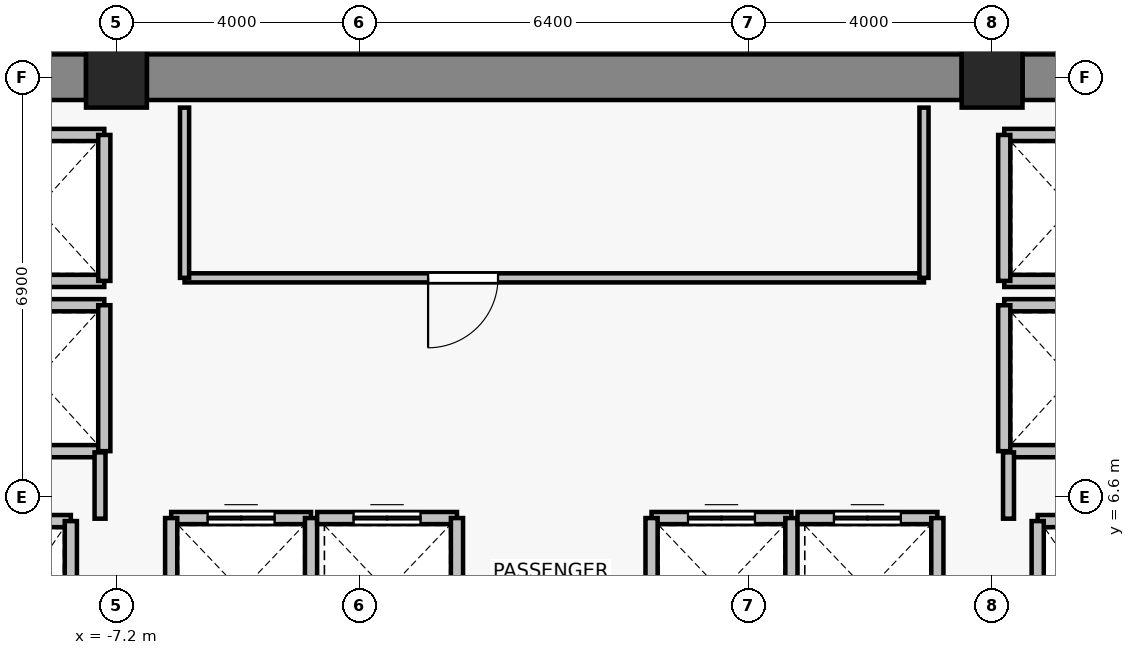
"""IFC4 building model, lengths in metres.
Left out: names, types, materials, properties, quantities, classifications, styles, units other than length and angle.
Written with IfcOpenShell. Run it as: python <this file> out.ifc"""

import sys

from ifc_helpers import new_model, si_unit, direction, frame, frame_2d, origin, origin_2d, place, context, subcontext, project, spatial, rectangle, extrude, source, transform, mapped, element, fill, save


model = new_model("IFC4")
c1 = context("Model", 3, precision=1e-05, world=origin(), true_north=direction((0.0, 1.0)))
c2 = subcontext(c1, "Body", "Model", "MODEL_VIEW")
j1 = project(units=[si_unit("LENGTHUNIT", "METRE"), si_unit("PLANEANGLEUNIT", "RADIAN")], contexts=[c1])
p1 = place(None, origin())
s1 = spatial("IfcSite", under=j1, at=p1, CompositionType="ELEMENT")
p2 = place(p1, origin())
s2 = spatial("IfcBuilding", under=s1, at=p2, CompositionType="ELEMENT")
p3 = place(p2, frame((0.0, 0.0, 109.9)))
s3 = spatial("IfcBuildingStorey", under=s2, at=p3, CompositionType="ELEMENT", Elevation=109.9)
for number, where, z_axis, x_axis in (
    (1, (-7.2, 13.5, 0.0), (0.0, 0.0, 1.0), (1.0, 0.0, 0.0)),
    (2, (7.2, 13.5, 0.0), (0.0, 0.0, 1.0), (1.0, 0.0, 0.0)),
):
    element("IfcColumn", number, at=place(p3, frame(where, z_axis=z_axis, x_axis=x_axis)), inside=s3, PredefinedType="COLUMN", context=c2, shape_type="SweptSolid", body=[
        extrude(rectangle(XDim=1.0, YDim=1.0, at=origin_2d()), origin(), (0.0, 0.0, 1.0), 3.3),
    ])
p4 = place(p3, frame((-13.9, 13.5, 0.0), z_axis=(0.0, 0.0, 1.0), x_axis=(1.0, 0.0, 0.0)))
e3 = element("IfcWall", 3, at=p4, inside=s3, PredefinedType="SHEAR", context=c2, shape_type="SweptSolid", body=[
    extrude(rectangle(XDim=6.2, YDim=0.75, at=frame_2d((3.1, 0.0))), origin(), (0.0, 0.0, 1.0), 3.075),
])
p5 = place(p3, frame((-6.7, 13.5, 0.0), z_axis=(0.0, 0.0, 1.0), x_axis=(1.0, 0.0, 0.0)))
e4 = element("IfcWall", 4, at=p5, inside=s3, PredefinedType="SHEAR", context=c2, shape_type="SweptSolid", body=[
    extrude(rectangle(XDim=13.4, YDim=0.75, at=frame_2d((6.7, 0.0))), origin(), (0.0, 0.0, 1.0), 3.075),
])
p6 = place(p3, frame((7.7, 13.5, 0.0), z_axis=(0.0, 0.0, 1.0), x_axis=(1.0, 0.0, 0.0)))
e5 = element("IfcWall", 5, at=p6, inside=s3, PredefinedType="SHEAR", context=c2, shape_type="SweptSolid", body=[
    extrude(rectangle(XDim=6.2, YDim=0.75, at=frame_2d((3.1, 0.0))), origin(), (0.0, 0.0, 1.0), 3.075),
])
p7 = place(p3, frame((-9.95, 6.2, 0.0), z_axis=(0.0, 0.0, 1.0), x_axis=(1.0, 0.0, 0.0)))
e6 = element("IfcWall", 6, at=p7, inside=s3, PredefinedType="SOLIDWALL", context=c2, shape_type="SweptSolid", body=[
    extrude(rectangle(XDim=2.0, YDim=0.2, at=frame_2d((1.0, 0.0))), origin(), (0.0, 0.0, 1.0), 3.075),
])
p8 = place(p3, frame((-7.95, 6.2, 0.0), z_axis=(0.0, 0.0, 1.0), x_axis=(0.0, -1.0, 0.0)))
e7 = element("IfcWall", 7, at=p8, inside=s3, PredefinedType="SOLIDWALL", context=c2, shape_type="SweptSolid", body=[
    extrude(rectangle(XDim=2.8, YDim=0.2, at=frame_2d((1.4, 0.0))), origin(), (0.0, 0.0, 1.0), 3.075),
])
p9 = place(p3, frame((7.95, 6.2, 0.0), z_axis=(0.0, 0.0, 1.0), x_axis=(1.0, 0.0, 0.0)))
e8 = element("IfcWall", 8, at=p9, inside=s3, PredefinedType="SOLIDWALL", context=c2, shape_type="SweptSolid", body=[
    extrude(rectangle(XDim=2.0, YDim=0.2, at=frame_2d((1.0, 0.0))), origin(), (0.0, 0.0, 1.0), 3.075),
])
p10 = place(p3, frame((7.95, 3.4, 0.0), z_axis=(0.0, 0.0, 1.0), x_axis=(0.0, 1.0, 0.0)))
e9 = element("IfcWall", 9, at=p10, inside=s3, PredefinedType="SOLIDWALL", context=c2, shape_type="SweptSolid", body=[
    extrude(rectangle(XDim=2.8, YDim=0.2, at=frame_2d((1.4, 0.0))), origin(), (0.0, 0.0, 1.0), 3.075),
])
p11 = place(p3, frame((-6.3, 6.25, 0.0), z_axis=(0.0, 0.0, 1.0), x_axis=(1.0, 0.0, 0.0)))
e10 = element("IfcWall", 10, at=p11, inside=s3, PredefinedType="SOLIDWALL", context=c2, shape_type="SweptSolid", body=[
    extrude(rectangle(XDim=2.3, YDim=0.2, at=frame_2d((1.15, 0.0))), origin(), (0.0, 0.0, 1.0), 3.075),
])
p12 = place(p11, frame((0.6, 0.0, 0.0)))
e11 = element("IfcOpeningElement", 11, at=p12, cuts=e10, PredefinedType="OPENING", context=c2, shape_type="SweptSolid", body=[
    extrude(rectangle(XDim=1.1, YDim=2.2, at=frame_2d((0.55, 1.1))), frame((0.0, 0.11, 0.0), z_axis=(0.0, -1.0, 0.0), x_axis=(1.0, 0.0, 0.0)), (0.0, 0.0, 1.0), 0.22),
])
for number, where, z_axis, x_axis in (
    (12, (-6.3, 3.85, 0.0), (0.0, 0.0, 1.0), (0.0, 1.0, 0.0)),
    (13, (-4.0, 6.25, 0.0), (0.0, 0.0, 1.0), (0.0, -1.0, 0.0)),
):
    element("IfcWall", number, at=place(p3, frame(where, z_axis=z_axis, x_axis=x_axis)), inside=s3, PredefinedType="SOLIDWALL", context=c2, shape_type="SweptSolid", body=[
        extrude(rectangle(XDim=2.4, YDim=0.2, at=frame_2d((1.2, 0.0))), origin(), (0.0, 0.0, 1.0), 3.075),
    ])
p13 = place(p3, frame((-3.9, 6.25, 0.0), z_axis=(0.0, 0.0, 1.0), x_axis=(1.0, 0.0, 0.0)))
e14 = element("IfcWall", 14, at=p13, inside=s3, PredefinedType="SOLIDWALL", context=c2, shape_type="SweptSolid", body=[
    extrude(rectangle(XDim=2.3, YDim=0.2, at=frame_2d((1.15, 0.0))), origin(), (0.0, 0.0, 1.0), 3.075),
])
p14 = place(p13, frame((0.6, 0.0, 0.0)))
e15 = element("IfcOpeningElement", 15, at=p14, cuts=e14, PredefinedType="OPENING", context=c2, shape_type="SweptSolid", body=[
    extrude(rectangle(XDim=1.1, YDim=2.2, at=frame_2d((0.55, 1.1))), frame((0.0, 0.11, 0.0), z_axis=(0.0, -1.0, 0.0), x_axis=(1.0, 0.0, 0.0)), (0.0, 0.0, 1.0), 0.22),
])
p15 = place(p3, frame((-1.6, 6.25, 0.0), z_axis=(0.0, 0.0, 1.0), x_axis=(0.0, -1.0, 0.0)))
e16 = element("IfcWall", 16, at=p15, inside=s3, PredefinedType="SOLIDWALL", context=c2, shape_type="SweptSolid", body=[
    extrude(rectangle(XDim=2.4, YDim=0.2, at=frame_2d((1.2, 0.0))), origin(), (0.0, 0.0, 1.0), 3.075),
])
p16 = place(p3, frame((1.6, 6.25, 0.0), z_axis=(0.0, 0.0, 1.0), x_axis=(1.0, 0.0, 0.0)))
e17 = element("IfcWall", 17, at=p16, inside=s3, PredefinedType="SOLIDWALL", context=c2, shape_type="SweptSolid", body=[
    extrude(rectangle(XDim=2.3, YDim=0.2, at=frame_2d((1.15, 0.0))), origin(), (0.0, 0.0, 1.0), 3.075),
])
p17 = place(p16, frame((0.6, 0.0, 0.0)))
e18 = element("IfcOpeningElement", 18, at=p17, cuts=e17, PredefinedType="OPENING", context=c2, shape_type="SweptSolid", body=[
    extrude(rectangle(XDim=1.1, YDim=2.2, at=frame_2d((0.55, 1.1))), frame((0.0, 0.11, 0.0), z_axis=(0.0, -1.0, 0.0), x_axis=(1.0, 0.0, 0.0)), (0.0, 0.0, 1.0), 0.22),
])
for number, where, z_axis, x_axis in (
    (19, (1.6, 3.85, 0.0), (0.0, 0.0, 1.0), (0.0, 1.0, 0.0)),
    (20, (3.9, 6.25, 0.0), (0.0, 0.0, 1.0), (0.0, -1.0, 0.0)),
):
    element("IfcWall", number, at=place(p3, frame(where, z_axis=z_axis, x_axis=x_axis)), inside=s3, PredefinedType="SOLIDWALL", context=c2, shape_type="SweptSolid", body=[
        extrude(rectangle(XDim=2.4, YDim=0.2, at=frame_2d((1.2, 0.0))), origin(), (0.0, 0.0, 1.0), 3.075),
    ])
p18 = place(p3, frame((4.0, 6.25, 0.0), z_axis=(0.0, 0.0, 1.0), x_axis=(1.0, 0.0, 0.0)))
e21 = element("IfcWall", 21, at=p18, inside=s3, PredefinedType="SOLIDWALL", context=c2, shape_type="SweptSolid", body=[
    extrude(rectangle(XDim=2.3, YDim=0.2, at=frame_2d((1.15, 0.0))), origin(), (0.0, 0.0, 1.0), 3.075),
])
p19 = place(p18, frame((0.6, 0.0, 0.0)))
e22 = element("IfcOpeningElement", 22, at=p19, cuts=e21, PredefinedType="OPENING", context=c2, shape_type="SweptSolid", body=[
    extrude(rectangle(XDim=1.1, YDim=2.2, at=frame_2d((0.55, 1.1))), frame((0.0, 0.11, 0.0), z_axis=(0.0, -1.0, 0.0), x_axis=(1.0, 0.0, 0.0)), (0.0, 0.0, 1.0), 0.22),
])
p20 = place(p3, frame((6.3, 6.25, 0.0), z_axis=(0.0, 0.0, 1.0), x_axis=(0.0, -1.0, 0.0)))
e23 = element("IfcWall", 23, at=p20, inside=s3, PredefinedType="SOLIDWALL", context=c2, shape_type="SweptSolid", body=[
    extrude(rectangle(XDim=2.4, YDim=0.2, at=frame_2d((1.2, 0.0))), origin(), (0.0, 0.0, 1.0), 3.075),
])
for number, where, z_axis, x_axis in (
    (24, (-7.4, 7.35, 0.0), (0.0, 0.0, 1.0), (-1.0, 0.0, 0.0)),
    (25, (-9.6, 9.75, 0.0), (0.0, 0.0, 1.0), (1.0, 0.0, 0.0)),
):
    element("IfcWall", number, at=place(p3, frame(where, z_axis=z_axis, x_axis=x_axis)), inside=s3, PredefinedType="SOLIDWALL", context=c2, shape_type="SweptSolid", body=[
        extrude(rectangle(XDim=2.2, YDim=0.2, at=frame_2d((1.1, 0.0))), origin(), (0.0, 0.0, 1.0), 2.515),
    ])
p21 = place(p3, frame((-7.4, 9.75, 0.0), z_axis=(0.0, 0.0, 1.0), x_axis=(0.0, -1.0, 0.0)))
e26 = element("IfcWall", 26, at=p21, inside=s3, PredefinedType="SOLIDWALL", context=c2, shape_type="SweptSolid", body=[
    extrude(rectangle(XDim=2.4, YDim=0.2, at=frame_2d((1.2, 0.0))), origin(), (0.0, 0.0, 1.0), 2.515),
])
for number, where, z_axis, x_axis in (
    (27, (-7.4, 10.15, 0.0), (0.0, 0.0, 1.0), (-1.0, 0.0, 0.0)),
    (28, (-9.6, 12.55, 0.0), (0.0, 0.0, 1.0), (1.0, 0.0, 0.0)),
):
    element("IfcWall", number, at=place(p3, frame(where, z_axis=z_axis, x_axis=x_axis)), inside=s3, PredefinedType="SOLIDWALL", context=c2, shape_type="SweptSolid", body=[
        extrude(rectangle(XDim=2.2, YDim=0.2, at=frame_2d((1.1, 0.0))), origin(), (0.0, 0.0, 1.0), 2.515),
    ])
p22 = place(p3, frame((-7.4, 12.55, 0.0), z_axis=(0.0, 0.0, 1.0), x_axis=(0.0, -1.0, 0.0)))
e29 = element("IfcWall", 29, at=p22, inside=s3, PredefinedType="SOLIDWALL", context=c2, shape_type="SweptSolid", body=[
    extrude(rectangle(XDim=2.4, YDim=0.2, at=frame_2d((1.2, 0.0))), origin(), (0.0, 0.0, 1.0), 2.515),
])
for number, where, z_axis, x_axis in (
    (30, (9.6, 7.35, 0.0), (0.0, 0.0, 1.0), (-1.0, 0.0, 0.0)),
    (31, (7.4, 9.75, 0.0), (0.0, 0.0, 1.0), (1.0, 0.0, 0.0)),
):
    element("IfcWall", number, at=place(p3, frame(where, z_axis=z_axis, x_axis=x_axis)), inside=s3, PredefinedType="SOLIDWALL", context=c2, shape_type="SweptSolid", body=[
        extrude(rectangle(XDim=2.2, YDim=0.2, at=frame_2d((1.1, 0.0))), origin(), (0.0, 0.0, 1.0), 2.515),
    ])
p23 = place(p3, frame((7.4, 7.35, 0.0), z_axis=(0.0, 0.0, 1.0), x_axis=(0.0, 1.0, 0.0)))
e32 = element("IfcWall", 32, at=p23, inside=s3, PredefinedType="SOLIDWALL", context=c2, shape_type="SweptSolid", body=[
    extrude(rectangle(XDim=2.4, YDim=0.2, at=frame_2d((1.2, 0.0))), origin(), (0.0, 0.0, 1.0), 2.515),
])
for number, where, z_axis, x_axis in (
    (33, (9.6, 10.15, 0.0), (0.0, 0.0, 1.0), (-1.0, 0.0, 0.0)),
    (34, (7.4, 12.55, 0.0), (0.0, 0.0, 1.0), (1.0, 0.0, 0.0)),
):
    element("IfcWall", number, at=place(p3, frame(where, z_axis=z_axis, x_axis=x_axis)), inside=s3, PredefinedType="SOLIDWALL", context=c2, shape_type="SweptSolid", body=[
        extrude(rectangle(XDim=2.2, YDim=0.2, at=frame_2d((1.1, 0.0))), origin(), (0.0, 0.0, 1.0), 2.515),
    ])
p24 = place(p3, frame((7.4, 10.15, 0.0), z_axis=(0.0, 0.0, 1.0), x_axis=(0.0, 1.0, 0.0)))
e35 = element("IfcWall", 35, at=p24, inside=s3, PredefinedType="SOLIDWALL", context=c2, shape_type="SweptSolid", body=[
    extrude(rectangle(XDim=2.4, YDim=0.2, at=frame_2d((1.2, 0.0))), origin(), (0.0, 0.0, 1.0), 2.515),
])
for number, where, z_axis, x_axis in (
    (36, (-7.47, 7.33, 0.0), (0.0, 0.0, 1.0), (0.0, -1.0, 0.0)),
    (37, (7.47, 6.24, 0.0), (0.0, 0.0, 1.0), (0.0, 1.0, 0.0)),
):
    element("IfcWall", number, at=place(p3, frame(where, z_axis=z_axis, x_axis=x_axis)), inside=s3, PredefinedType="PARTITIONING", context=c2, shape_type="SweptSolid", body=[
        extrude(rectangle(XDim=1.09, YDim=0.18, at=frame_2d((0.545, 0.0))), origin(), (0.0, 0.0, 1.0), 2.515),
    ])
p25 = place(p3, frame((6.08, 10.2, 0.0), z_axis=(0.0, 0.0, 1.0), x_axis=(-1.0, 0.0, 0.0)))
e38 = element("IfcWall", 38, at=p25, inside=s3, PredefinedType="PARTITIONING", context=c2, shape_type="SweptSolid", body=[
    extrude(rectangle(XDim=12.16, YDim=0.15, at=frame_2d((6.08, 0.0))), origin(), (0.0, 0.0, 1.0), 2.59),
])
p26 = place(p25, frame((7.005, 0.0, 0.0)))
e39 = element("IfcOpeningElement", 39, at=p26, cuts=e38, PredefinedType="OPENING", context=c2, shape_type="SweptSolid", body=[
    extrude(rectangle(XDim=1.15, YDim=2.15, at=frame_2d((0.575, 1.075))), frame((0.0, 0.085, 0.0), z_axis=(0.0, -1.0, 0.0), x_axis=(1.0, 0.0, 0.0)), (0.0, 0.0, 1.0), 0.17),
])
for number, where, z_axis, x_axis in (
    (40, (-6.08, 10.2, 0.0), (0.0, 0.0, 1.0), (0.0, 1.0, 0.0)),
    (41, (6.08, 13.0, 0.0), (0.0, 0.0, 1.0), (0.0, -1.0, 0.0)),
):
    element("IfcWall", number, at=place(p3, frame(where, z_axis=z_axis, x_axis=x_axis)), inside=s3, PredefinedType="PARTITIONING", context=c2, shape_type="SweptSolid", body=[
        extrude(rectangle(XDim=2.8, YDim=0.15, at=frame_2d((1.4, 0.0))), origin(), (0.0, 0.0, 1.0), 3.075),
    ])
m1 = source(origin(), c2, "Body", "SweptSolid", [
    extrude(rectangle(XDim=1.1, YDim=2.2, at=frame_2d((0.55, 1.1))), frame((0.0, 0.025, 0.0), z_axis=(0.0, -1.0, 0.0), x_axis=(1.0, 0.0, 0.0)), (0.0, 0.0, 1.0), 0.05),
])
p27 = place(p12, origin())
e42 = element("IfcDoor", 42, at=p27, inside=s3, OperationType="DOUBLE_DOOR_SLIDING", PredefinedType="DOOR", context=c2, shape_type="MappedRepresentation", body=[
    mapped(m1, transform((0.0, 0.0, 0.0), x_axis=(1.0, 0.0, 0.0), y_axis=(0.0, 1.0, 0.0), z_axis=(0.0, 0.0, 1.0), scale=1.0)),
])
fill(e11, e42)
p28 = place(p14, origin())
e43 = element("IfcDoor", 43, at=p28, inside=s3, OperationType="DOUBLE_DOOR_SLIDING", PredefinedType="DOOR", context=c2, shape_type="MappedRepresentation", body=[
    mapped(m1, transform((0.0, 0.0, 0.0), x_axis=(1.0, 0.0, 0.0), y_axis=(0.0, 1.0, 0.0), z_axis=(0.0, 0.0, 1.0), scale=1.0)),
])
fill(e15, e43)
p29 = place(p17, origin())
e44 = element("IfcDoor", 44, at=p29, inside=s3, OperationType="DOUBLE_DOOR_SLIDING", PredefinedType="DOOR", context=c2, shape_type="MappedRepresentation", body=[
    mapped(m1, transform((0.0, 0.0, 0.0), x_axis=(1.0, 0.0, 0.0), y_axis=(0.0, 1.0, 0.0), z_axis=(0.0, 0.0, 1.0), scale=1.0)),
])
fill(e18, e44)
p30 = place(p19, origin())
e45 = element("IfcDoor", 45, at=p30, inside=s3, OperationType="DOUBLE_DOOR_SLIDING", PredefinedType="DOOR", context=c2, shape_type="MappedRepresentation", body=[
    mapped(m1, transform((0.0, 0.0, 0.0), x_axis=(1.0, 0.0, 0.0), y_axis=(0.0, 1.0, 0.0), z_axis=(0.0, 0.0, 1.0), scale=1.0)),
])
fill(e22, e45)
m2 = source(origin(), c2, "Body", "SweptSolid", [
    extrude(rectangle(XDim=1.15, YDim=2.15, at=frame_2d((0.575, 1.075))), frame((0.0, 0.025, 0.0), z_axis=(0.0, -1.0, 0.0), x_axis=(1.0, 0.0, 0.0)), (0.0, 0.0, 1.0), 0.05),
])
p31 = place(p26, origin())
e46 = element("IfcDoor", 46, at=p31, inside=s3, OperationType="SINGLE_SWING_RIGHT", PredefinedType="DOOR", context=c2, shape_type="MappedRepresentation", body=[
    mapped(m2, transform((0.0, 0.0, 0.0), x_axis=(1.0, 0.0, 0.0), y_axis=(0.0, 1.0, 0.0), z_axis=(0.0, 0.0, 1.0), scale=1.0)),
])
fill(e39, e46)
save(model, sys.argv[1])
